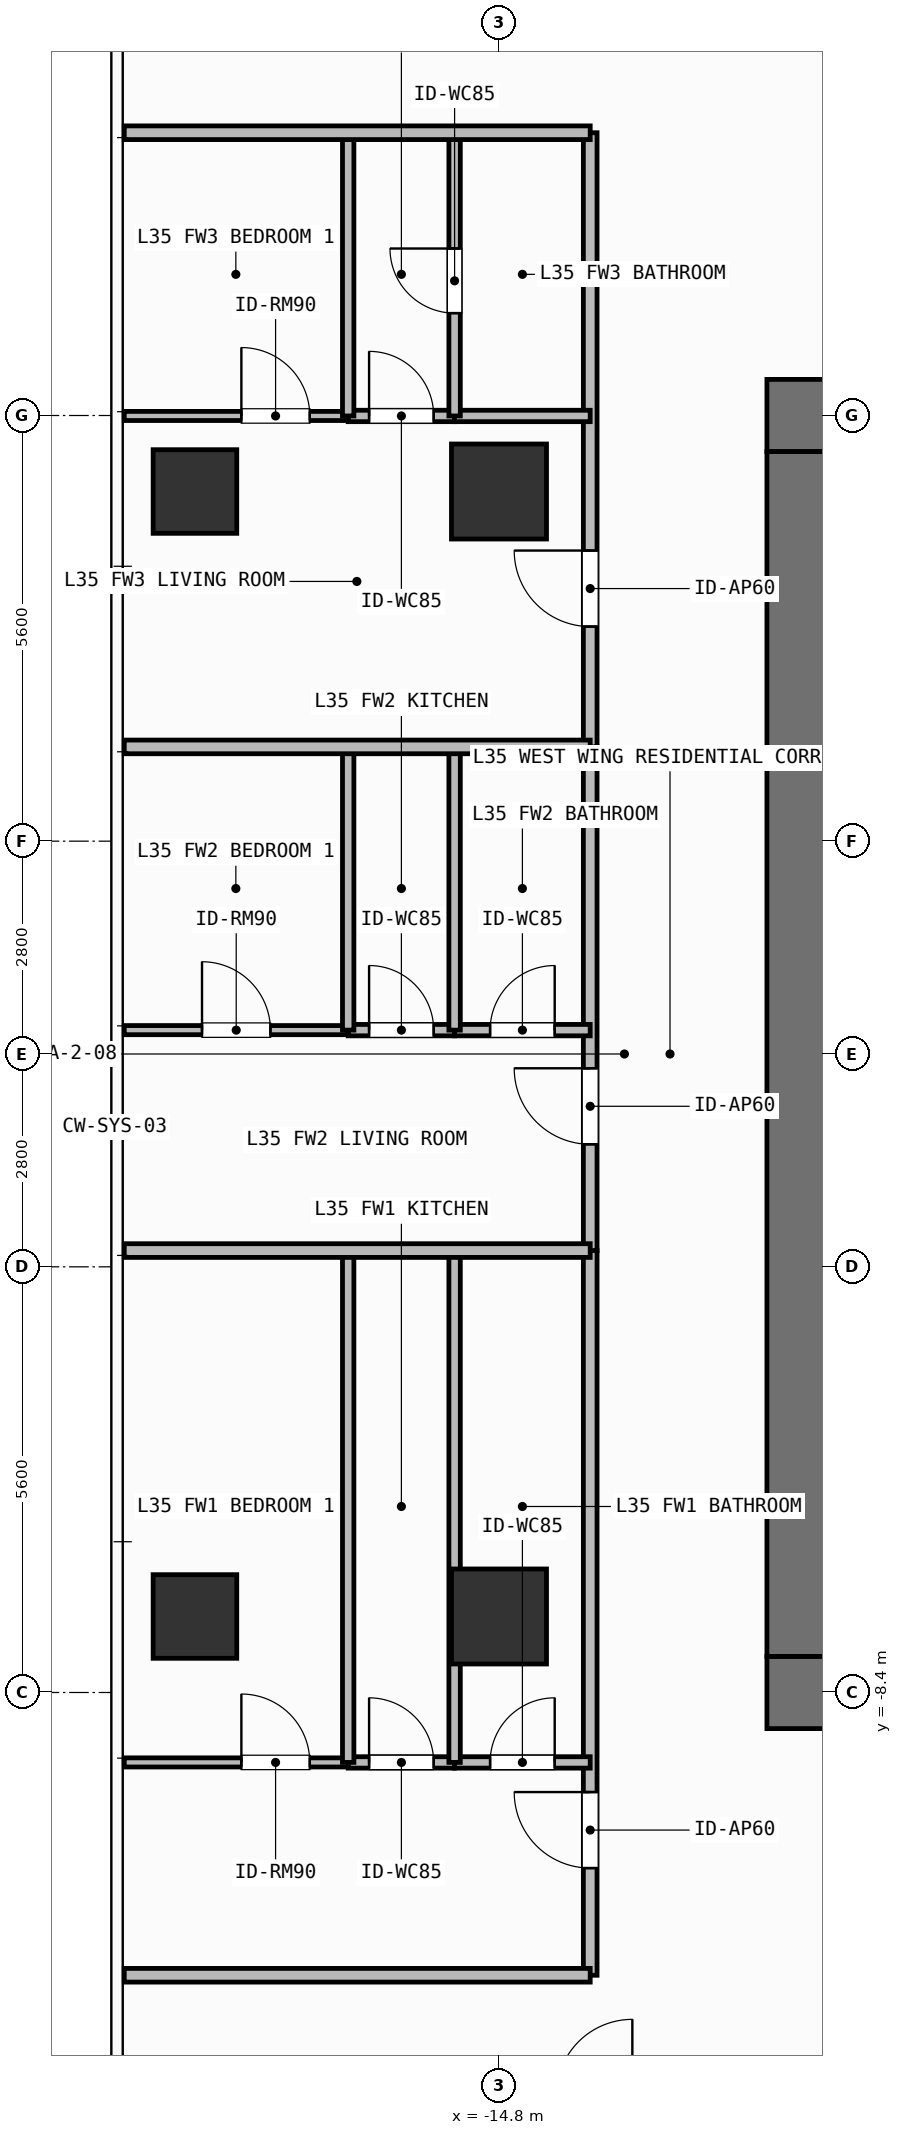
"""IFC4 building model, lengths in metres.
Left out: names, types, materials, properties, quantities, classifications, styles, units other than length and angle.
Written with IfcOpenShell. Run it as: python <this file> out.ifc"""

import sys

from ifc_helpers import new_model, si_unit, direction, frame, frame_2d, origin, origin_2d, place, context, subcontext, project, spatial, rectangle, extrude, element, fill, save


model = new_model("IFC4")
c1 = context("Model", 3, precision=1e-05, world=origin(), true_north=direction((0.0, 1.0)))
c2 = subcontext(c1, "Body", "Model", "MODEL_VIEW")
j1 = project(units=[si_unit("LENGTHUNIT", "METRE"), si_unit("PLANEANGLEUNIT", "RADIAN")], contexts=[c1])
p1 = place(None, origin())
s1 = spatial("IfcSite", under=j1, at=p1, CompositionType="ELEMENT")
p2 = place(p1, origin())
s2 = spatial("IfcBuilding", under=s1, at=p2, CompositionType="ELEMENT")
p3 = place(p2, frame((0.0, 0.0, 140.7)))
s3 = spatial("IfcBuildingStorey", under=s2, at=p3, CompositionType="ELEMENT", Elevation=140.7)
for number, where, z_axis, x_axis in (
    (1, (-11.275, -8.4, 0.0), (0.0, 0.0, 1.0), (1.0, 0.0, 0.0)),
    (2, (-11.275, 8.4, 0.0), (0.0, 0.0, 1.0), (1.0, 0.0, 0.0)),
):
    element("IfcWall", number, at=place(p3, frame(where, z_axis=z_axis, x_axis=x_axis)), inside=s3, PredefinedType="SHEAR", context=c2, shape_type="SweptSolid", body=[
        extrude(rectangle(XDim=1.575, YDim=0.95, at=frame_2d((0.788, 0.0))), origin(), (0.0, 0.0, 1.0), 3.9),
    ])
p4 = place(p3, frame((-10.8, -7.925, 0.0), z_axis=(0.0, 0.0, 1.0), x_axis=(0.0, 1.0, 0.0)))
e3 = element("IfcWall", 3, at=p4, inside=s3, PredefinedType="SHEAR", context=c2, shape_type="SweptSolid", body=[
    extrude(rectangle(XDim=15.85, YDim=0.95, at=frame_2d((7.925, 0.0))), origin(), (0.0, 0.0, 1.0), 3.9),
])
for number, where, z_axis, x_axis in (
    (4, (-14.8, -7.4, 0.0), (0.0, 0.0, 1.0), (1.0, 0.0, 0.0)),
    (5, (-14.8, 7.4, 0.0), (0.0, 0.0, 1.0), (1.0, 0.0, 0.0)),
):
    element("IfcColumn", number, at=place(p3, frame(where, z_axis=z_axis, x_axis=x_axis)), inside=s3, PredefinedType="COLUMN", context=c2, shape_type="SweptSolid", body=[
        extrude(rectangle(XDim=1.25, YDim=1.25, at=origin_2d()), origin(), (0.0, 0.0, 1.0), 3.9),
    ])
for number, where, z_axis, x_axis in (
    (6, (-18.8, -7.4, 0.0), (0.0, 0.0, 1.0), (1.0, 0.0, 0.0)),
    (7, (-18.8, 7.4, 0.0), (0.0, 0.0, 1.0), (1.0, 0.0, 0.0)),
):
    element("IfcColumn", number, at=place(p3, frame(where, z_axis=z_axis, x_axis=x_axis)), inside=s3, PredefinedType="COLUMN", context=c2, shape_type="SweptSolid", body=[
        extrude(rectangle(XDim=1.1, YDim=1.1, at=origin_2d()), origin(), (0.0, 0.0, 1.0), 3.9),
    ])
p5 = place(p3, frame((-13.6, -12.12, 0.0), z_axis=(0.0, 0.0, 1.0), x_axis=(0.0, 1.0, 0.0)))
e8 = element("IfcWall", 8, at=p5, inside=s3, PredefinedType="PARTITIONING", context=c2, shape_type="SweptSolid", body=[
    extrude(rectangle(XDim=9.534, YDim=0.18, at=frame_2d((4.767, 0.0))), origin(), (0.0, 0.0, 1.0), 3.68),
])
p6 = place(p5, frame((1.41, 0.0, 0.0)))
e9 = element("IfcOpeningElement", 9, at=p6, cuts=e8, PredefinedType="OPENING", context=c2, shape_type="SweptSolid", body=[
    extrude(rectangle(XDim=1.0, YDim=2.2, at=frame_2d((0.5, 1.1))), frame((0.0, 0.1, 0.0), z_axis=(0.0, -1.0, 0.0), x_axis=(1.0, 0.0, 0.0)), (0.0, 0.0, 1.0), 0.2),
])
p7 = place(p3, frame((-16.784, -9.32, 0.0), z_axis=(0.0, 0.0, 1.0), x_axis=(1.0, 0.0, 0.0)))
e10 = element("IfcWall", 10, at=p7, inside=s3, PredefinedType="PARTITIONING", context=c2, shape_type="SweptSolid", body=[
    extrude(rectangle(XDim=1.4, YDim=0.15, at=frame_2d((0.7, 0.0))), origin(), (0.0, 0.0, 1.0), 3.68),
])
p8 = place(p7, frame((0.275, 0.0, 0.0)))
e11 = element("IfcOpeningElement", 11, at=p8, cuts=e10, PredefinedType="OPENING", context=c2, shape_type="SweptSolid", body=[
    extrude(rectangle(XDim=0.85, YDim=2.1, at=frame_2d((0.425, 1.05))), frame((0.0, 0.085, 0.0), z_axis=(0.0, -1.0, 0.0), x_axis=(1.0, 0.0, 0.0)), (0.0, 0.0, 1.0), 0.17),
])
p9 = place(p3, frame((-15.384, -9.32, 0.0), z_axis=(0.0, 0.0, 1.0), x_axis=(1.0, 0.0, 0.0)))
e12 = element("IfcWall", 12, at=p9, inside=s3, PredefinedType="PARTITIONING", context=c2, shape_type="SweptSolid", body=[
    extrude(rectangle(XDim=1.784, YDim=0.15, at=frame_2d((0.892, 0.0))), origin(), (0.0, 0.0, 1.0), 3.68),
])
p10 = place(p9, frame((0.467, 0.0, 0.0)))
e13 = element("IfcOpeningElement", 13, at=p10, cuts=e12, PredefinedType="OPENING", context=c2, shape_type="SweptSolid", body=[
    extrude(rectangle(XDim=0.85, YDim=2.1, at=frame_2d((0.425, 1.05))), frame((0.0, 0.085, 0.0), z_axis=(0.0, -1.0, 0.0), x_axis=(1.0, 0.0, 0.0)), (0.0, 0.0, 1.0), 0.17),
])
p11 = place(p3, frame((-19.73, -9.32, 0.0), z_axis=(0.0, 0.0, 1.0), x_axis=(1.0, 0.0, 0.0)))
e14 = element("IfcWall", 14, at=p11, inside=s3, PredefinedType="PARTITIONING", context=c2, shape_type="SweptSolid", body=[
    extrude(rectangle(XDim=2.946, YDim=0.12, at=frame_2d((1.473, 0.0))), origin(), (0.0, 0.0, 1.0), 3.68),
])
p12 = place(p11, frame((1.541, 0.0, 0.0)))
e15 = element("IfcOpeningElement", 15, at=p12, cuts=e14, PredefinedType="OPENING", context=c2, shape_type="SweptSolid", body=[
    extrude(rectangle(XDim=0.9, YDim=2.1, at=frame_2d((0.45, 1.05))), frame((0.0, 0.07, 0.0), z_axis=(0.0, -1.0, 0.0), x_axis=(1.0, 0.0, 0.0)), (0.0, 0.0, 1.0), 0.14),
])
p13 = place(p3, frame((-13.6, -2.586, 0.0), z_axis=(0.0, 0.0, 1.0), x_axis=(0.0, 1.0, 0.0)))
e16 = element("IfcWall", 16, at=p13, inside=s3, PredefinedType="PARTITIONING", context=c2, shape_type="SweptSolid", body=[
    extrude(rectangle(XDim=6.626, YDim=0.18, at=frame_2d((3.313, 0.0))), origin(), (0.0, 0.0, 1.0), 3.68),
])
p14 = place(p13, frame((1.398, 0.0, 0.0)))
e17 = element("IfcOpeningElement", 17, at=p14, cuts=e16, PredefinedType="OPENING", context=c2, shape_type="SweptSolid", body=[
    extrude(rectangle(XDim=1.0, YDim=2.2, at=frame_2d((0.5, 1.1))), frame((0.0, 0.1, 0.0), z_axis=(0.0, -1.0, 0.0), x_axis=(1.0, 0.0, 0.0)), (0.0, 0.0, 1.0), 0.2),
])
p15 = place(p3, frame((-16.784, 0.314, 0.0), z_axis=(0.0, 0.0, 1.0), x_axis=(1.0, 0.0, 0.0)))
e18 = element("IfcWall", 18, at=p15, inside=s3, PredefinedType="PARTITIONING", context=c2, shape_type="SweptSolid", body=[
    extrude(rectangle(XDim=1.4, YDim=0.15, at=frame_2d((0.7, 0.0))), origin(), (0.0, 0.0, 1.0), 3.68),
])
p16 = place(p15, frame((0.275, 0.0, 0.0)))
e19 = element("IfcOpeningElement", 19, at=p16, cuts=e18, PredefinedType="OPENING", context=c2, shape_type="SweptSolid", body=[
    extrude(rectangle(XDim=0.85, YDim=2.1, at=frame_2d((0.425, 1.05))), frame((0.0, 0.085, 0.0), z_axis=(0.0, -1.0, 0.0), x_axis=(1.0, 0.0, 0.0)), (0.0, 0.0, 1.0), 0.17),
])
p17 = place(p3, frame((-15.384, 0.314, 0.0), z_axis=(0.0, 0.0, 1.0), x_axis=(1.0, 0.0, 0.0)))
e20 = element("IfcWall", 20, at=p17, inside=s3, PredefinedType="PARTITIONING", context=c2, shape_type="SweptSolid", body=[
    extrude(rectangle(XDim=1.784, YDim=0.15, at=frame_2d((0.892, 0.0))), origin(), (0.0, 0.0, 1.0), 3.68),
])
p18 = place(p17, frame((0.467, 0.0, 0.0)))
e21 = element("IfcOpeningElement", 21, at=p18, cuts=e20, PredefinedType="OPENING", context=c2, shape_type="SweptSolid", body=[
    extrude(rectangle(XDim=0.85, YDim=2.1, at=frame_2d((0.425, 1.05))), frame((0.0, 0.085, 0.0), z_axis=(0.0, -1.0, 0.0), x_axis=(1.0, 0.0, 0.0)), (0.0, 0.0, 1.0), 0.17),
])
p19 = place(p3, frame((-19.73, 0.314, 0.0), z_axis=(0.0, 0.0, 1.0), x_axis=(1.0, 0.0, 0.0)))
e22 = element("IfcWall", 22, at=p19, inside=s3, PredefinedType="PARTITIONING", context=c2, shape_type="SweptSolid", body=[
    extrude(rectangle(XDim=2.946, YDim=0.12, at=frame_2d((1.473, 0.0))), origin(), (0.0, 0.0, 1.0), 3.68),
])
p20 = place(p19, frame((1.023, 0.0, 0.0)))
e23 = element("IfcOpeningElement", 23, at=p20, cuts=e22, PredefinedType="OPENING", context=c2, shape_type="SweptSolid", body=[
    extrude(rectangle(XDim=0.9, YDim=2.1, at=frame_2d((0.45, 1.05))), frame((0.0, 0.07, 0.0), z_axis=(0.0, -1.0, 0.0), x_axis=(1.0, 0.0, 0.0)), (0.0, 0.0, 1.0), 0.14),
])
p21 = place(p3, frame((-13.6, 4.04, 0.0), z_axis=(0.0, 0.0, 1.0), x_axis=(0.0, 1.0, 0.0)))
e24 = element("IfcWall", 24, at=p21, inside=s3, PredefinedType="PARTITIONING", context=c2, shape_type="SweptSolid", body=[
    extrude(rectangle(XDim=8.08, YDim=0.18, at=frame_2d((4.04, 0.0))), origin(), (0.0, 0.0, 1.0), 3.68),
])
p22 = place(p21, frame((1.583, 0.0, 0.0)))
e25 = element("IfcOpeningElement", 25, at=p22, cuts=e24, PredefinedType="OPENING", context=c2, shape_type="SweptSolid", body=[
    extrude(rectangle(XDim=1.0, YDim=2.2, at=frame_2d((0.5, 1.1))), frame((0.0, 0.1, 0.0), z_axis=(0.0, -1.0, 0.0), x_axis=(1.0, 0.0, 0.0)), (0.0, 0.0, 1.0), 0.2),
])
p23 = place(p3, frame((-16.784, 8.394, 0.0), z_axis=(0.0, 0.0, 1.0), x_axis=(1.0, 0.0, 0.0)))
e26 = element("IfcWall", 26, at=p23, inside=s3, PredefinedType="PARTITIONING", context=c2, shape_type="SweptSolid", body=[
    extrude(rectangle(XDim=1.4, YDim=0.15, at=frame_2d((0.7, 0.0))), origin(), (0.0, 0.0, 1.0), 3.68),
])
p24 = place(p23, frame((0.275, 0.0, 0.0)))
e27 = element("IfcOpeningElement", 27, at=p24, cuts=e26, PredefinedType="OPENING", context=c2, shape_type="SweptSolid", body=[
    extrude(rectangle(XDim=0.85, YDim=2.1, at=frame_2d((0.425, 1.05))), frame((0.0, 0.085, 0.0), z_axis=(0.0, -1.0, 0.0), x_axis=(1.0, 0.0, 0.0)), (0.0, 0.0, 1.0), 0.17),
])
p25 = place(p3, frame((-15.384, 8.394, 0.0), z_axis=(0.0, 0.0, 1.0), x_axis=(1.0, 0.0, 0.0)))
e28 = element("IfcWall", 28, at=p25, inside=s3, PredefinedType="PARTITIONING", context=c2, shape_type="SweptSolid", body=[
    extrude(rectangle(XDim=1.784, YDim=0.15, at=frame_2d((0.892, 0.0))), origin(), (0.0, 0.0, 1.0), 3.68),
])
p26 = place(p3, frame((-19.73, 8.394, 0.0), z_axis=(0.0, 0.0, 1.0), x_axis=(1.0, 0.0, 0.0)))
e29 = element("IfcWall", 29, at=p26, inside=s3, PredefinedType="PARTITIONING", context=c2, shape_type="SweptSolid", body=[
    extrude(rectangle(XDim=2.946, YDim=0.12, at=frame_2d((1.473, 0.0))), origin(), (0.0, 0.0, 1.0), 3.68),
])
p27 = place(p26, frame((1.541, 0.0, 0.0)))
e30 = element("IfcOpeningElement", 30, at=p27, cuts=e29, PredefinedType="OPENING", context=c2, shape_type="SweptSolid", body=[
    extrude(rectangle(XDim=0.9, YDim=2.1, at=frame_2d((0.45, 1.05))), frame((0.0, 0.07, 0.0), z_axis=(0.0, -1.0, 0.0), x_axis=(1.0, 0.0, 0.0)), (0.0, 0.0, 1.0), 0.14),
])
for number, where, z_axis, x_axis in (
    (31, (-15.384, -9.32, 0.0), (0.0, 0.0, 1.0), (0.0, 1.0, 0.0)),
    (32, (-16.784, -9.32, 0.0), (0.0, 0.0, 1.0), (0.0, 1.0, 0.0)),
):
    element("IfcWall", number, at=place(p3, frame(where, z_axis=z_axis, x_axis=x_axis)), inside=s3, PredefinedType="PARTITIONING", context=c2, shape_type="SweptSolid", body=[
        extrude(rectangle(XDim=6.734, YDim=0.15, at=frame_2d((3.367, 0.0))), origin(), (0.0, 0.0, 1.0), 3.68),
    ])
for number, where, z_axis, x_axis in (
    (33, (-15.384, 0.314, 0.0), (0.0, 0.0, 1.0), (0.0, 1.0, 0.0)),
    (34, (-16.784, 0.314, 0.0), (0.0, 0.0, 1.0), (0.0, 1.0, 0.0)),
):
    element("IfcWall", number, at=place(p3, frame(where, z_axis=z_axis, x_axis=x_axis)), inside=s3, PredefinedType="PARTITIONING", context=c2, shape_type="SweptSolid", body=[
        extrude(rectangle(XDim=3.726, YDim=0.15, at=frame_2d((1.863, 0.0))), origin(), (0.0, 0.0, 1.0), 3.68),
    ])
p28 = place(p3, frame((-19.73, -2.586, 0.0), z_axis=(0.0, 0.0, 1.0), x_axis=(1.0, 0.0, 0.0)))
e35 = element("IfcWall", 35, at=p28, inside=s3, PredefinedType="PARTITIONING", context=c2, shape_type="SweptSolid", body=[
    extrude(rectangle(XDim=6.13, YDim=0.18, at=frame_2d((3.065, 0.0))), origin(), (0.0, 0.0, 1.0), 3.68),
])
p29 = place(p3, frame((-15.384, 8.394, 0.0), z_axis=(0.0, 0.0, 1.0), x_axis=(0.0, 1.0, 0.0)))
e36 = element("IfcWall", 36, at=p29, inside=s3, PredefinedType="PARTITIONING", context=c2, shape_type="SweptSolid", body=[
    extrude(rectangle(XDim=3.726, YDim=0.15, at=frame_2d((1.863, 0.0))), origin(), (0.0, 0.0, 1.0), 3.68),
])
p30 = place(p29, frame((1.353, 0.0, 0.0)))
e37 = element("IfcOpeningElement", 37, at=p30, cuts=e36, PredefinedType="OPENING", context=c2, shape_type="SweptSolid", body=[
    extrude(rectangle(XDim=0.85, YDim=2.1, at=frame_2d((0.425, 1.05))), frame((0.0, 0.085, 0.0), z_axis=(0.0, -1.0, 0.0), x_axis=(1.0, 0.0, 0.0)), (0.0, 0.0, 1.0), 0.17),
])
p31 = place(p3, frame((-16.784, 8.394, 0.0), z_axis=(0.0, 0.0, 1.0), x_axis=(0.0, 1.0, 0.0)))
e38 = element("IfcWall", 38, at=p31, inside=s3, PredefinedType="PARTITIONING", context=c2, shape_type="SweptSolid", body=[
    extrude(rectangle(XDim=3.726, YDim=0.15, at=frame_2d((1.863, 0.0))), origin(), (0.0, 0.0, 1.0), 3.68),
])
for number, where, z_axis, x_axis in (
    (39, (-19.73, 4.04, 0.0), (0.0, 0.0, 1.0), (1.0, 0.0, 0.0)),
    (40, (-19.73, -12.12, 0.0), (0.0, 0.0, 1.0), (1.0, 0.0, 0.0)),
    (41, (-19.73, 12.12, 0.0), (0.0, 0.0, 1.0), (1.0, 0.0, 0.0)),
):
    element("IfcWall", number, at=place(p3, frame(where, z_axis=z_axis, x_axis=x_axis)), inside=s3, PredefinedType="PARTITIONING", context=c2, shape_type="SweptSolid", body=[
        extrude(rectangle(XDim=6.13, YDim=0.18, at=frame_2d((3.065, 0.0))), origin(), (0.0, 0.0, 1.0), 3.68),
    ])
p32 = place(p6, origin())
e42 = element("IfcDoor", 42, at=p32, inside=s3, OperationType="SINGLE_SWING_RIGHT", PredefinedType="DOOR", context=c2, shape_type="SweptSolid", body=[
    extrude(rectangle(XDim=1.0, YDim=2.2, at=frame_2d((0.5, 1.1))), frame((0.0, 0.025, 0.0), z_axis=(0.0, -1.0, 0.0), x_axis=(1.0, 0.0, 0.0)), (0.0, 0.0, 1.0), 0.05),
])
fill(e9, e42)
p33 = place(p8, origin())
e43 = element("IfcDoor", 43, at=p33, inside=s3, OperationType="SINGLE_SWING_LEFT", PredefinedType="DOOR", context=c2, shape_type="SweptSolid", body=[
    extrude(rectangle(XDim=0.85, YDim=2.1, at=frame_2d((0.425, 1.05))), frame((0.0, 0.025, 0.0), z_axis=(0.0, -1.0, 0.0), x_axis=(1.0, 0.0, 0.0)), (0.0, 0.0, 1.0), 0.05),
])
fill(e11, e43)
p34 = place(p10, origin())
e44 = element("IfcDoor", 44, at=p34, inside=s3, OperationType="SINGLE_SWING_RIGHT", PredefinedType="DOOR", context=c2, shape_type="SweptSolid", body=[
    extrude(rectangle(XDim=0.85, YDim=2.1, at=frame_2d((0.425, 1.05))), frame((0.0, 0.025, 0.0), z_axis=(0.0, -1.0, 0.0), x_axis=(1.0, 0.0, 0.0)), (0.0, 0.0, 1.0), 0.05),
])
fill(e13, e44)
p35 = place(p12, origin())
e45 = element("IfcDoor", 45, at=p35, inside=s3, OperationType="SINGLE_SWING_LEFT", PredefinedType="DOOR", context=c2, shape_type="SweptSolid", body=[
    extrude(rectangle(XDim=0.9, YDim=2.1, at=frame_2d((0.45, 1.05))), frame((0.0, 0.025, 0.0), z_axis=(0.0, -1.0, 0.0), x_axis=(1.0, 0.0, 0.0)), (0.0, 0.0, 1.0), 0.05),
])
fill(e15, e45)
p36 = place(p14, origin())
e46 = element("IfcDoor", 46, at=p36, inside=s3, OperationType="SINGLE_SWING_RIGHT", PredefinedType="DOOR", context=c2, shape_type="SweptSolid", body=[
    extrude(rectangle(XDim=1.0, YDim=2.2, at=frame_2d((0.5, 1.1))), frame((0.0, 0.025, 0.0), z_axis=(0.0, -1.0, 0.0), x_axis=(1.0, 0.0, 0.0)), (0.0, 0.0, 1.0), 0.05),
])
fill(e17, e46)
p37 = place(p16, origin())
e47 = element("IfcDoor", 47, at=p37, inside=s3, OperationType="SINGLE_SWING_LEFT", PredefinedType="DOOR", context=c2, shape_type="SweptSolid", body=[
    extrude(rectangle(XDim=0.85, YDim=2.1, at=frame_2d((0.425, 1.05))), frame((0.0, 0.025, 0.0), z_axis=(0.0, -1.0, 0.0), x_axis=(1.0, 0.0, 0.0)), (0.0, 0.0, 1.0), 0.05),
])
fill(e19, e47)
p38 = place(p18, origin())
e48 = element("IfcDoor", 48, at=p38, inside=s3, OperationType="SINGLE_SWING_RIGHT", PredefinedType="DOOR", context=c2, shape_type="SweptSolid", body=[
    extrude(rectangle(XDim=0.85, YDim=2.1, at=frame_2d((0.425, 1.05))), frame((0.0, 0.025, 0.0), z_axis=(0.0, -1.0, 0.0), x_axis=(1.0, 0.0, 0.0)), (0.0, 0.0, 1.0), 0.05),
])
fill(e21, e48)
p39 = place(p20, origin())
e49 = element("IfcDoor", 49, at=p39, inside=s3, OperationType="SINGLE_SWING_LEFT", PredefinedType="DOOR", context=c2, shape_type="SweptSolid", body=[
    extrude(rectangle(XDim=0.9, YDim=2.1, at=frame_2d((0.45, 1.05))), frame((0.0, 0.025, 0.0), z_axis=(0.0, -1.0, 0.0), x_axis=(1.0, 0.0, 0.0)), (0.0, 0.0, 1.0), 0.05),
])
fill(e23, e49)
p40 = place(p22, origin())
e50 = element("IfcDoor", 50, at=p40, inside=s3, OperationType="SINGLE_SWING_RIGHT", PredefinedType="DOOR", context=c2, shape_type="SweptSolid", body=[
    extrude(rectangle(XDim=1.0, YDim=2.2, at=frame_2d((0.5, 1.1))), frame((0.0, 0.025, 0.0), z_axis=(0.0, -1.0, 0.0), x_axis=(1.0, 0.0, 0.0)), (0.0, 0.0, 1.0), 0.05),
])
fill(e25, e50)
p41 = place(p24, origin())
e51 = element("IfcDoor", 51, at=p41, inside=s3, OperationType="SINGLE_SWING_LEFT", PredefinedType="DOOR", context=c2, shape_type="SweptSolid", body=[
    extrude(rectangle(XDim=0.85, YDim=2.1, at=frame_2d((0.425, 1.05))), frame((0.0, 0.025, 0.0), z_axis=(0.0, -1.0, 0.0), x_axis=(1.0, 0.0, 0.0)), (0.0, 0.0, 1.0), 0.05),
])
fill(e27, e51)
p42 = place(p30, origin())
e52 = element("IfcDoor", 52, at=p42, inside=s3, OperationType="SINGLE_SWING_RIGHT", PredefinedType="DOOR", context=c2, shape_type="SweptSolid", body=[
    extrude(rectangle(XDim=0.85, YDim=2.1, at=frame_2d((0.425, 1.05))), frame((0.0, 0.025, 0.0), z_axis=(0.0, -1.0, 0.0), x_axis=(1.0, 0.0, 0.0)), (0.0, 0.0, 1.0), 0.05),
])
fill(e37, e52)
p43 = place(p27, origin())
e53 = element("IfcDoor", 53, at=p43, inside=s3, OperationType="SINGLE_SWING_LEFT", PredefinedType="DOOR", context=c2, shape_type="SweptSolid", body=[
    extrude(rectangle(XDim=0.9, YDim=2.1, at=frame_2d((0.45, 1.05))), frame((0.0, 0.025, 0.0), z_axis=(0.0, -1.0, 0.0), x_axis=(1.0, 0.0, 0.0)), (0.0, 0.0, 1.0), 0.05),
])
fill(e30, e53)
save(model, sys.argv[1])
